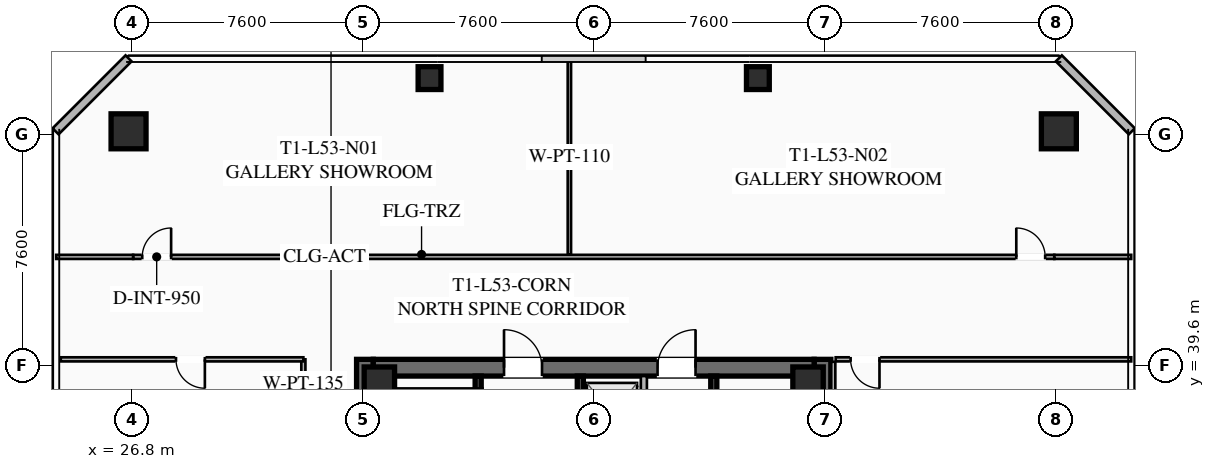
"""IFC4 building model, lengths in metres.
Left out: names, types, materials, properties, quantities, classifications, styles, units other than length and angle.
Written with IfcOpenShell. Run it as: python <this file> out.ifc"""

import sys

from ifc_helpers import new_model, si_unit, direction, frame, frame_2d, origin, origin_2d, place, context, subcontext, project, spatial, rectangle, hollow_rectangle, extrude, element, fill, save


model = new_model("IFC4")
c1 = context("Model", 3, precision=1e-05, world=origin(), true_north=direction((0.0, 1.0)))
c2 = subcontext(c1, "Body", "Model", "MODEL_VIEW")
j1 = project(units=[si_unit("LENGTHUNIT", "METRE"), si_unit("PLANEANGLEUNIT", "RADIAN")], contexts=[c1])
p1 = place(None, origin())
s1 = spatial("IfcSite", under=j1, at=p1, CompositionType="ELEMENT")
p2 = place(p1, origin())
s2 = spatial("IfcBuilding", under=s1, at=p2, CompositionType="ELEMENT")
p3 = place(p2, frame((0.0, 0.0, 196.05)))
s3 = spatial("IfcBuildingStorey", under=s2, at=p3, CompositionType="ELEMENT", Elevation=196.05)
for number, where, z_axis, x_axis in (
    (1, (34.475, 24.2, 0.0), (0.0, 0.0, 1.0), (0.0, 1.0, 0.0)),
    (2, (49.525, 39.8, 0.0), (0.0, 0.0, 1.0), (0.0, -1.0, 0.0)),
):
    element("IfcWall", number, at=place(p3, frame(where, z_axis=z_axis, x_axis=x_axis)), inside=s3, PredefinedType="SHEAR", context=c2, shape_type="SweptSolid", body=[
        extrude(rectangle(XDim=15.6, YDim=0.55, at=frame_2d((7.8, 0.0))), origin(), (0.0, 0.0, 1.0), 3.55),
    ])
p4 = place(p3, frame((34.75, 39.525, 0.0), z_axis=(0.0, 0.0, 1.0), x_axis=(1.0, 0.0, 0.0)))
e3 = element("IfcWall", 3, at=p4, inside=s3, PredefinedType="SHEAR", context=c2, shape_type="SweptSolid", body=[
    extrude(rectangle(XDim=14.5, YDim=0.55, at=frame_2d((7.25, 0.0))), origin(), (0.0, 0.0, 1.0), 3.55),
])
p5 = place(p4, frame((4.3, 0.0, 0.0)))
e4 = element("IfcOpeningElement", 4, at=p5, cuts=e3, PredefinedType="OPENING", context=c2, shape_type="SweptSolid", body=[
    extrude(rectangle(XDim=1.25, YDim=2.25, at=frame_2d((0.625, 1.125))), frame((0.0, 0.285, 0.0), z_axis=(0.0, -1.0, 0.0), x_axis=(1.0, 0.0, 0.0)), (0.0, 0.0, 1.0), 0.57),
])
p6 = place(p4, frame((9.35, 0.0, 0.0)))
e5 = element("IfcOpeningElement", 5, at=p6, cuts=e3, PredefinedType="OPENING", context=c2, shape_type="SweptSolid", body=[
    extrude(rectangle(XDim=1.25, YDim=2.25, at=frame_2d((0.625, 1.125))), frame((0.0, 0.285, 0.0), z_axis=(0.0, -1.0, 0.0), x_axis=(1.0, 0.0, 0.0)), (0.0, 0.0, 1.0), 0.57),
])
for number, where, z_axis, x_axis in (
    (6, (49.05, 39.05, 0.0), (0.0, 0.0, 1.0), (1.0, 0.0, 0.0)),
    (7, (34.95, 39.05, 0.0), (0.0, 0.0, 1.0), (1.0, 0.0, 0.0)),
):
    element("IfcColumn", number, at=place(p3, frame(where, z_axis=z_axis, x_axis=x_axis)), inside=s3, PredefinedType="COLUMN", context=c2, shape_type="SweptSolid", body=[
        extrude(hollow_rectangle(XDim=1.0, YDim=1.0, WallThickness=0.04, at=origin_2d()), origin(), (0.0, 0.0, 1.0), 3.25),
    ])
for number, where, z_axis, x_axis in (
    (8, (57.3, 47.3, 0.0), (0.0, 0.0, 1.0), (1.0, 0.0, 0.0)),
    (9, (26.7, 47.3, 0.0), (0.0, 0.0, 1.0), (1.0, 0.0, 0.0)),
):
    element("IfcColumn", number, at=place(p3, frame(where, z_axis=z_axis, x_axis=x_axis)), inside=s3, PredefinedType="COLUMN", context=c2, shape_type="SweptSolid", body=[
        extrude(hollow_rectangle(XDim=1.15, YDim=1.15, WallThickness=0.045, at=origin_2d()), origin(), (0.0, 0.0, 1.0), 3.25),
    ])
for number, where, z_axis, x_axis in (
    (10, (47.4, 49.05, 0.0), (0.0, 0.0, 1.0), (1.0, 0.0, 0.0)),
    (11, (36.6, 49.05, 0.0), (0.0, 0.0, 1.0), (1.0, 0.0, 0.0)),
):
    element("IfcColumn", number, at=place(p3, frame(where, z_axis=z_axis, x_axis=x_axis)), inside=s3, PredefinedType="COLUMN", context=c2, shape_type="SweptSolid", body=[
        extrude(hollow_rectangle(XDim=0.75, YDim=0.75, WallThickness=0.032, at=origin_2d()), origin(), (0.0, 0.0, 1.0), 3.25),
    ])
for number, where, z_axis, x_axis in (
    (12, (24.3, 47.3, 0.0), (0.0, 0.0, 1.0), (0.707, 0.707, 0.0)),
    (13, (57.3, 49.7, 0.0), (0.0, 0.0, 1.0), (0.707, -0.707, 0.0)),
):
    element("IfcWall", number, at=place(p3, frame(where, z_axis=z_axis, x_axis=x_axis)), inside=s3, PredefinedType="SOLIDWALL", context=c2, shape_type="SweptSolid", body=[
        extrude(rectangle(XDim=3.394, YDim=0.28, at=frame_2d((1.697, 0.0))), origin(), (0.0, 0.0, 1.0), 3.25),
    ])
p7 = place(p3, frame((38.2, 31.2, 0.0), z_axis=(0.0, 0.0, 1.0), x_axis=(0.0, 1.0, 0.0)))
e14 = element("IfcWall", 14, at=p7, inside=s3, PredefinedType="SHEAR", context=c2, shape_type="SweptSolid", body=[
    extrude(rectangle(XDim=8.05, YDim=0.2, at=frame_2d((4.025, 0.0))), origin(), (0.0, 0.0, 1.0), 3.25),
])
p8 = place(p7, frame((0.45, 0.0, 0.0)))
e15 = element("IfcOpeningElement", 15, at=p8, cuts=e14, PredefinedType="OPENING", context=c2, shape_type="SweptSolid", body=[
    extrude(rectangle(XDim=1.15, YDim=2.2, at=frame_2d((0.575, 1.1))), frame((0.0, 0.11, 0.0), z_axis=(0.0, -1.0, 0.0), x_axis=(1.0, 0.0, 0.0)), (0.0, 0.0, 1.0), 0.22),
])
p9 = place(p3, frame((41.56, 24.75, 0.0), z_axis=(0.0, 0.0, 1.0), x_axis=(0.0, 1.0, 0.0)))
e16 = element("IfcWall", 16, at=p9, inside=s3, PredefinedType="SHEAR", context=c2, shape_type="SweptSolid", body=[
    extrude(rectangle(XDim=14.5, YDim=0.2, at=frame_2d((7.25, 0.0))), origin(), (0.0, 0.0, 1.0), 3.25),
])
p10 = place(p3, frame((45.95, 39.25, 0.0), z_axis=(0.0, 0.0, 1.0), x_axis=(0.0, -1.0, 0.0)))
e17 = element("IfcWall", 17, at=p10, inside=s3, PredefinedType="SHEAR", context=c2, shape_type="SweptSolid", body=[
    extrude(rectangle(XDim=6.45, YDim=0.2, at=frame_2d((3.225, 0.0))), origin(), (0.0, 0.0, 1.0), 3.25),
])
p11 = place(p10, frame((4.975, 0.0, 0.0)))
e18 = element("IfcOpeningElement", 18, at=p11, cuts=e17, PredefinedType="OPENING", context=c2, shape_type="SweptSolid", body=[
    extrude(rectangle(XDim=1.1, YDim=2.2, at=frame_2d((0.55, 1.1))), frame((0.0, 0.11, 0.0), z_axis=(0.0, -1.0, 0.0), x_axis=(1.0, 0.0, 0.0)), (0.0, 0.0, 1.0), 0.22),
])
p12 = place(p10, frame((2.925, 0.0, 0.0)))
e19 = element("IfcOpeningElement", 19, at=p12, cuts=e17, PredefinedType="OPENING", context=c2, shape_type="SweptSolid", body=[
    extrude(rectangle(XDim=1.1, YDim=2.2, at=frame_2d((0.55, 1.1))), frame((0.0, 0.11, 0.0), z_axis=(0.0, -1.0, 0.0), x_axis=(1.0, 0.0, 0.0)), (0.0, 0.0, 1.0), 0.22),
])
p13 = place(p10, frame((0.925, 0.0, 0.0)))
e20 = element("IfcOpeningElement", 20, at=p13, cuts=e17, PredefinedType="OPENING", context=c2, shape_type="SweptSolid", body=[
    extrude(rectangle(XDim=1.1, YDim=2.2, at=frame_2d((0.55, 1.1))), frame((0.0, 0.11, 0.0), z_axis=(0.0, -1.0, 0.0), x_axis=(1.0, 0.0, 0.0)), (0.0, 0.0, 1.0), 0.22),
])
p14 = place(p3, frame((43.65, 32.35, 0.0), z_axis=(0.0, 0.0, 1.0), x_axis=(0.0, 1.0, 0.0)))
e21 = element("IfcWall", 21, at=p14, inside=s3, PredefinedType="SOLIDWALL", context=c2, shape_type="SweptSolid", body=[
    extrude(rectangle(XDim=6.9, YDim=0.2, at=frame_2d((3.45, 0.0))), origin(), (0.0, 0.0, 1.0), 3.25),
])
p15 = place(p14, frame((0.575, 0.0, 0.0)))
e22 = element("IfcOpeningElement", 22, at=p15, cuts=e21, PredefinedType="OPENING", context=c2, shape_type="SweptSolid", body=[
    extrude(rectangle(XDim=1.1, YDim=2.2, at=frame_2d((0.55, 1.1))), frame((0.0, 0.11, 0.0), z_axis=(0.0, -1.0, 0.0), x_axis=(1.0, 0.0, 0.0)), (0.0, 0.0, 1.0), 0.22),
])
p16 = place(p14, frame((2.825, 0.0, 0.0)))
e23 = element("IfcOpeningElement", 23, at=p16, cuts=e21, PredefinedType="OPENING", context=c2, shape_type="SweptSolid", body=[
    extrude(rectangle(XDim=1.1, YDim=2.2, at=frame_2d((0.55, 1.1))), frame((0.0, 0.11, 0.0), z_axis=(0.0, -1.0, 0.0), x_axis=(1.0, 0.0, 0.0)), (0.0, 0.0, 1.0), 0.22),
])
p17 = place(p14, frame((5.075, 0.0, 0.0)))
e24 = element("IfcOpeningElement", 24, at=p17, cuts=e21, PredefinedType="OPENING", context=c2, shape_type="SweptSolid", body=[
    extrude(rectangle(XDim=1.1, YDim=2.2, at=frame_2d((0.55, 1.1))), frame((0.0, 0.11, 0.0), z_axis=(0.0, -1.0, 0.0), x_axis=(1.0, 0.0, 0.0)), (0.0, 0.0, 1.0), 0.22),
])
p18 = place(p3, frame((32.45, 35.4, 0.0), z_axis=(0.0, 0.0, 1.0), x_axis=(0.0, 1.0, 0.0)))
e25 = element("IfcWall", 25, at=p18, inside=s3, PredefinedType="PARTITIONING", context=c2, shape_type="SweptSolid", body=[
    extrude(rectangle(XDim=4.4, YDim=0.135, at=frame_2d((2.2, 0.0))), origin(), (0.0, 0.0, 1.0), 2.393),
])
p19 = place(p3, frame((26.85, 43.17, 0.0), z_axis=(0.0, 0.0, 1.0), x_axis=(1.0, 0.0, 0.0)))
e26 = element("IfcWall", 26, at=p19, inside=s3, PredefinedType="PARTITIONING", context=c2, shape_type="SweptSolid", body=[
    extrude(rectangle(XDim=30.3, YDim=0.135, at=frame_2d((15.15, 0.0))), origin(), (0.0, 0.0, 1.0), 2.393),
])
p20 = place(p19, frame((0.3, 0.0, 0.0)))
e27 = element("IfcOpeningElement", 27, at=p20, cuts=e26, PredefinedType="OPENING", context=c2, shape_type="SweptSolid", body=[
    extrude(rectangle(XDim=0.95, YDim=2.05, at=frame_2d((0.475, 1.025))), frame((0.0, 0.077, 0.0), z_axis=(0.0, -1.0, 0.0), x_axis=(1.0, 0.0, 0.0)), (0.0, 0.0, 1.0), 0.155),
])
p21 = place(p19, frame((29.05, 0.0, 0.0)))
e28 = element("IfcOpeningElement", 28, at=p21, cuts=e26, PredefinedType="OPENING", context=c2, shape_type="SweptSolid", body=[
    extrude(rectangle(XDim=0.95, YDim=2.05, at=frame_2d((0.475, 1.025))), frame((0.0, 0.077, 0.0), z_axis=(0.0, -1.0, 0.0), x_axis=(1.0, 0.0, 0.0)), (0.0, 0.0, 1.0), 0.155),
])
for number, where, z_axis, x_axis in (
    (29, (24.32, 43.17, 0.0), (0.0, 0.0, 1.0), (1.0, 0.0, 0.0)),
    (30, (57.15, 43.17, 0.0), (0.0, 0.0, 1.0), (1.0, 0.0, 0.0)),
):
    element("IfcWall", number, at=place(p3, frame(where, z_axis=z_axis, x_axis=x_axis)), inside=s3, PredefinedType="PARTITIONING", context=c2, shape_type="SweptSolid", body=[
        extrude(rectangle(XDim=2.53, YDim=0.135, at=frame_2d((1.265, 0.0))), origin(), (0.0, 0.0, 1.0), 2.393),
    ])
p22 = place(p3, frame((41.2, 43.25, 0.0), z_axis=(0.0, 0.0, 1.0), x_axis=(0.0, 1.0, 0.0)))
e31 = element("IfcWall", 31, at=p22, inside=s3, PredefinedType="PARTITIONING", context=c2, shape_type="SweptSolid", body=[
    extrude(rectangle(XDim=6.43, YDim=0.11, at=frame_2d((3.215, 0.0))), origin(), (0.0, 0.0, 1.0), 2.393),
])
p23 = place(p3, frame((49.88, 39.72, 0.0), z_axis=(0.0, 0.0, 1.0), x_axis=(0.0, -1.0, 0.0)))
e32 = element("IfcWall", 32, at=p23, inside=s3, PredefinedType="PARTITIONING", context=c2, shape_type="SweptSolid", body=[
    extrude(rectangle(XDim=15.44, YDim=0.135, at=frame_2d((7.72, 0.0))), origin(), (0.0, 0.0, 1.0), 2.393),
])
p24 = place(p3, frame((59.68, 39.8, 0.0), z_axis=(0.0, 0.0, 1.0), x_axis=(-1.0, 0.0, 0.0)))
e33 = element("IfcWall", 33, at=p24, inside=s3, PredefinedType="PARTITIONING", context=c2, shape_type="SweptSolid", body=[
    extrude(rectangle(XDim=9.72, YDim=0.135, at=frame_2d((4.86, 0.0))), origin(), (0.0, 0.0, 1.0), 2.393),
])
p25 = place(p24, frame((8.28, 0.0, 0.0)))
e34 = element("IfcOpeningElement", 34, at=p25, cuts=e33, PredefinedType="OPENING", context=c2, shape_type="SweptSolid", body=[
    extrude(rectangle(XDim=0.95, YDim=2.05, at=frame_2d((0.475, 1.025))), frame((0.0, 0.077, 0.0), z_axis=(0.0, -1.0, 0.0), x_axis=(1.0, 0.0, 0.0)), (0.0, 0.0, 1.0), 0.155),
])
p26 = place(p3, frame((32.45, 39.8, 0.0), z_axis=(0.0, 0.0, 1.0), x_axis=(-1.0, 0.0, 0.0)))
e35 = element("IfcWall", 35, at=p26, inside=s3, PredefinedType="PARTITIONING", context=c2, shape_type="SweptSolid", body=[
    extrude(rectangle(XDim=7.98, YDim=0.135, at=frame_2d((3.99, 0.0))), origin(), (0.0, 0.0, 1.0), 2.393),
])
p27 = place(p26, frame((3.24, 0.0, 0.0)))
e36 = element("IfcOpeningElement", 36, at=p27, cuts=e35, PredefinedType="OPENING", context=c2, shape_type="SweptSolid", body=[
    extrude(rectangle(XDim=0.95, YDim=2.05, at=frame_2d((0.475, 1.025))), frame((0.0, 0.077, 0.0), z_axis=(0.0, -1.0, 0.0), x_axis=(1.0, 0.0, 0.0)), (0.0, 0.0, 1.0), 0.155),
])
p28 = place(p5, origin())
e37 = element("IfcDoor", 37, at=p28, inside=s3, OperationType="SINGLE_SWING_LEFT", PredefinedType="DOOR", context=c2, shape_type="SweptSolid", body=[
    extrude(rectangle(XDim=1.25, YDim=2.25, at=frame_2d((0.625, 1.125))), frame((0.0, 0.025, 0.0), z_axis=(0.0, -1.0, 0.0), x_axis=(1.0, 0.0, 0.0)), (0.0, 0.0, 1.0), 0.05),
])
fill(e4, e37)
p29 = place(p6, origin())
e38 = element("IfcDoor", 38, at=p29, inside=s3, OperationType="SINGLE_SWING_RIGHT", PredefinedType="DOOR", context=c2, shape_type="SweptSolid", body=[
    extrude(rectangle(XDim=1.25, YDim=2.25, at=frame_2d((0.625, 1.125))), frame((0.0, 0.025, 0.0), z_axis=(0.0, -1.0, 0.0), x_axis=(1.0, 0.0, 0.0)), (0.0, 0.0, 1.0), 0.05),
])
fill(e5, e38)
p30 = place(p20, origin())
e39 = element("IfcDoor", 39, at=p30, inside=s3, OperationType="SINGLE_SWING_RIGHT", PredefinedType="DOOR", context=c2, shape_type="SweptSolid", body=[
    extrude(rectangle(XDim=0.95, YDim=2.05, at=frame_2d((0.475, 1.025))), frame((0.0, 0.025, 0.0), z_axis=(0.0, -1.0, 0.0), x_axis=(1.0, 0.0, 0.0)), (0.0, 0.0, 1.0), 0.05),
])
fill(e27, e39)
p31 = place(p21, origin())
e40 = element("IfcDoor", 40, at=p31, inside=s3, OperationType="SINGLE_SWING_LEFT", PredefinedType="DOOR", context=c2, shape_type="SweptSolid", body=[
    extrude(rectangle(XDim=0.95, YDim=2.05, at=frame_2d((0.475, 1.025))), frame((0.0, 0.025, 0.0), z_axis=(0.0, -1.0, 0.0), x_axis=(1.0, 0.0, 0.0)), (0.0, 0.0, 1.0), 0.05),
])
fill(e28, e40)
p32 = place(p25, origin())
e41 = element("IfcDoor", 41, at=p32, inside=s3, OperationType="SINGLE_SWING_LEFT", PredefinedType="DOOR", context=c2, shape_type="SweptSolid", body=[
    extrude(rectangle(XDim=0.95, YDim=2.05, at=frame_2d((0.475, 1.025))), frame((0.0, 0.025, 0.0), z_axis=(0.0, -1.0, 0.0), x_axis=(1.0, 0.0, 0.0)), (0.0, 0.0, 1.0), 0.05),
])
fill(e34, e41)
p33 = place(p27, origin())
e42 = element("IfcDoor", 42, at=p33, inside=s3, OperationType="SINGLE_SWING_LEFT", PredefinedType="DOOR", context=c2, shape_type="SweptSolid", body=[
    extrude(rectangle(XDim=0.95, YDim=2.05, at=frame_2d((0.475, 1.025))), frame((0.0, 0.025, 0.0), z_axis=(0.0, -1.0, 0.0), x_axis=(1.0, 0.0, 0.0)), (0.0, 0.0, 1.0), 0.05),
])
fill(e36, e42)
save(model, sys.argv[1])
